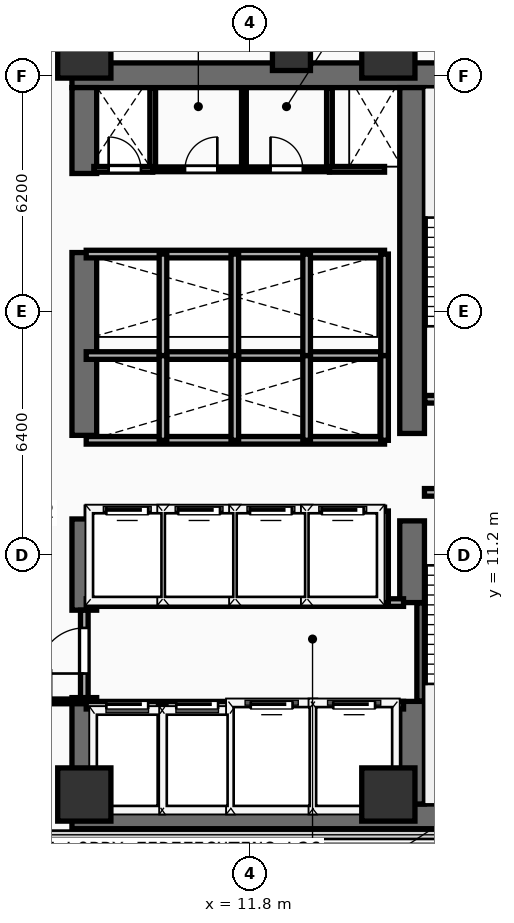
"""IFC4 building model, lengths in metres.
Left out: names, types, materials, properties, quantities, classifications, styles, units other than length and angle.
Written with IfcOpenShell. Run it as: python <this file> out.ifc"""

import sys

from ifc_helpers import new_model, si_unit, direction, frame, frame_2d, origin, origin_2d, place, context, subcontext, project, spatial, rectangle, extrude, element, fill, save


model = new_model("IFC4")
c1 = context("Model", 3, precision=1e-05, world=origin(), true_north=direction((0.0, 1.0)))
c2 = subcontext(c1, "Body", "Model", "MODEL_VIEW")
j1 = project(units=[si_unit("LENGTHUNIT", "METRE"), si_unit("PLANEANGLEUNIT", "RADIAN")], contexts=[c1])
p1 = place(None, origin())
s1 = spatial("IfcSite", under=j1, at=p1, CompositionType="ELEMENT")
p2 = place(p1, origin())
s2 = spatial("IfcBuilding", under=s1, at=p2, CompositionType="ELEMENT")
p3 = place(p2, frame((0.0, 0.0, 103.1)))
s3 = spatial("IfcBuildingStorey", under=s2, at=p3, CompositionType="ELEMENT", Elevation=103.1)
for number, where, z_axis, x_axis in (
    (1, (7.125, 4.325, 0.0), (0.0, 0.0, 1.0), (1.0, 0.0, 0.0)),
    (2, (7.125, 23.825, 0.0), (0.0, 0.0, 1.0), (1.0, 0.0, 0.0)),
):
    element("IfcWall", number, at=place(p3, frame(where, z_axis=z_axis, x_axis=x_axis)), inside=s3, PredefinedType="SHEAR", context=c2, shape_type="SweptSolid", body=[
        extrude(rectangle(XDim=14.0, YDim=0.65, at=frame_2d((7.0, 0.0))), origin(), (0.0, 0.0, 1.0), 3.54),
    ])
p4 = place(p3, frame((7.45, 4.65, 0.0), z_axis=(0.0, 0.0, 1.0), x_axis=(0.0, 1.0, 0.0)))
e3 = element("IfcWall", 3, at=p4, inside=s3, PredefinedType="SHEAR", context=c2, shape_type="SweptSolid", body=[
    extrude(rectangle(XDim=2.8, YDim=0.65, at=frame_2d((1.4, 0.0))), origin(), (0.0, 0.0, 1.0), 3.54),
])
p5 = place(p3, frame((7.45, 9.75, 0.0), z_axis=(0.0, 0.0, 1.0), x_axis=(0.0, 1.0, 0.0)))
e4 = element("IfcWall", 4, at=p5, inside=s3, PredefinedType="SHEAR", context=c2, shape_type="SweptSolid", body=[
    extrude(rectangle(XDim=2.4, YDim=0.65, at=frame_2d((1.2, 0.0))), origin(), (0.0, 0.0, 1.0), 3.54),
])
p6 = place(p3, frame((7.45, 14.35, 0.0), z_axis=(0.0, 0.0, 1.0), x_axis=(0.0, 1.0, 0.0)))
e5 = element("IfcWall", 5, at=p6, inside=s3, PredefinedType="SHEAR", context=c2, shape_type="SweptSolid", body=[
    extrude(rectangle(XDim=4.81, YDim=0.65, at=frame_2d((2.405, 0.0))), origin(), (0.0, 0.0, 1.0), 3.54),
])
p7 = place(p3, frame((7.45, 21.24, 0.0), z_axis=(0.0, 0.0, 1.0), x_axis=(0.0, 1.0, 0.0)))
e6 = element("IfcWall", 6, at=p7, inside=s3, PredefinedType="SHEAR", context=c2, shape_type="SweptSolid", body=[
    extrude(rectangle(XDim=2.26, YDim=0.65, at=frame_2d((1.13, 0.0))), origin(), (0.0, 0.0, 1.0), 3.54),
])
p8 = place(p3, frame((16.075, 4.65, 0.0), z_axis=(0.0, 0.0, 1.0), x_axis=(0.0, 1.0, 0.0)))
e7 = element("IfcWall", 7, at=p8, inside=s3, PredefinedType="SHEAR", context=c2, shape_type="SweptSolid", body=[
    extrude(rectangle(XDim=2.7, YDim=0.65, at=frame_2d((1.35, 0.0))), origin(), (0.0, 0.0, 1.0), 3.54),
])
p9 = place(p3, frame((16.075, 9.95, 0.0), z_axis=(0.0, 0.0, 1.0), x_axis=(0.0, 1.0, 0.0)))
e8 = element("IfcWall", 8, at=p9, inside=s3, PredefinedType="SHEAR", context=c2, shape_type="SweptSolid", body=[
    extrude(rectangle(XDim=2.15, YDim=0.65, at=frame_2d((1.075, 0.0))), origin(), (0.0, 0.0, 1.0), 3.54),
])
p10 = place(p3, frame((16.075, 14.4, 0.0), z_axis=(0.0, 0.0, 1.0), x_axis=(0.0, 1.0, 0.0)))
e9 = element("IfcWall", 9, at=p10, inside=s3, PredefinedType="SHEAR", context=c2, shape_type="SweptSolid", body=[
    extrude(rectangle(XDim=9.1, YDim=0.65, at=frame_2d((4.55, 0.0))), origin(), (0.0, 0.0, 1.0), 3.54),
])
for number, where, z_axis, x_axis in (
    (10, (7.45, 4.9, 0.0), (0.0, 0.0, 1.0), (1.0, 0.0, 0.0)),
    (11, (15.45, 4.9, 0.0), (0.0, 0.0, 1.0), (1.0, 0.0, 0.0)),
    (12, (7.45, 24.45, 0.0), (0.0, 0.0, 1.0), (1.0, 0.0, 0.0)),
    (13, (15.45, 24.45, 0.0), (0.0, 0.0, 1.0), (1.0, 0.0, 0.0)),
):
    element("IfcColumn", number, at=place(p3, frame(where, z_axis=z_axis, x_axis=x_axis)), inside=s3, PredefinedType="COLUMN", context=c2, shape_type="SweptSolid", body=[
        extrude(rectangle(XDim=1.4, YDim=1.4, at=origin_2d()), origin(), (0.0, 0.0, 1.0), 3.54),
    ])
p11 = place(p3, frame((12.9, 24.45, 0.0), z_axis=(0.0, 0.0, 1.0), x_axis=(1.0, 0.0, 0.0)))
e14 = element("IfcColumn", 14, at=p11, inside=s3, PredefinedType="COLUMN", context=c2, shape_type="SweptSolid", body=[
    extrude(rectangle(XDim=1.0, YDim=1.0, at=origin_2d()), origin(), (0.0, 0.0, 1.0), 3.54),
])
p12 = place(p3, frame((16.3, 7.36, 0.0), z_axis=(0.0, 0.0, 1.0), x_axis=(0.0, 1.0, 0.0)))
e15 = element("IfcWall", 15, at=p12, inside=s3, PredefinedType="SHEAR", context=c2, shape_type="SweptSolid", body=[
    extrude(rectangle(XDim=2.58, YDim=0.2, at=frame_2d((1.29, 0.0))), origin(), (0.0, 0.0, 1.0), 3.54),
])
p13 = place(p3, frame((16.4, 12.85, 0.0), z_axis=(0.0, 0.0, 1.0), x_axis=(1.0, 0.0, 0.0)))
e16 = element("IfcWall", 16, at=p13, inside=s3, PredefinedType="PARTITIONING", context=c2, shape_type="SweptSolid", body=[
    extrude(rectangle(XDim=3.96, YDim=0.2, at=frame_2d((1.98, 0.0))), origin(), (0.0, 0.0, 1.0), 3.54),
])
p14 = place(p13, frame((1.304, 0.0, 0.0)))
e17 = element("IfcOpeningElement", 17, at=p14, cuts=e16, PredefinedType="OPENING", context=c2, shape_type="SweptSolid", body=[
    extrude(rectangle(XDim=1.1, YDim=2.2, at=frame_2d((0.55, 1.1))), frame((0.0, 0.11, 0.0), z_axis=(0.0, -1.0, 0.0), x_axis=(1.0, 0.0, 0.0)), (0.0, 0.0, 1.0), 0.22),
])
p15 = place(p3, frame((16.41, 15.3, 0.0), z_axis=(0.0, 0.0, 1.0), x_axis=(1.0, 0.0, 0.0)))
e18 = element("IfcWall", 18, at=p15, inside=s3, PredefinedType="PARTITIONING", context=c2, shape_type="SweptSolid", body=[
    extrude(rectangle(XDim=3.95, YDim=0.2, at=frame_2d((1.975, 0.0))), origin(), (0.0, 0.0, 1.0), 3.54),
])
p16 = place(p15, frame((1.294, 0.0, 0.0)))
e19 = element("IfcOpeningElement", 19, at=p16, cuts=e18, PredefinedType="OPENING", context=c2, shape_type="SweptSolid", body=[
    extrude(rectangle(XDim=1.1, YDim=2.2, at=frame_2d((0.55, 1.1))), frame((0.0, 0.11, 0.0), z_axis=(0.0, -1.0, 0.0), x_axis=(1.0, 0.0, 0.0)), (0.0, 0.0, 1.0), 0.22),
])
p17 = place(p3, frame((7.5, 7.25, 0.0), z_axis=(0.0, 0.0, 1.0), x_axis=(1.0, 0.0, 0.0)))
e20 = element("IfcWall", 20, at=p17, inside=s3, PredefinedType="PARTITIONING", context=c2, shape_type="SweptSolid", body=[
    extrude(rectangle(XDim=8.35, YDim=0.2, at=frame_2d((4.175, 0.0))), origin(), (0.0, 0.0, 1.0), 3.54),
])
p18 = place(p17, frame((0.53, 0.0, 0.0)))
e21 = element("IfcOpeningElement", 21, at=p18, cuts=e20, PredefinedType="OPENING", context=c2, shape_type="SweptSolid", body=[
    extrude(rectangle(XDim=1.1, YDim=2.2, at=frame_2d((0.55, 1.1))), frame((0.0, 0.11, 0.0), z_axis=(0.0, -1.0, 0.0), x_axis=(1.0, 0.0, 0.0)), (0.0, 0.0, 1.0), 0.22),
])
p19 = place(p17, frame((2.37, 0.0, 0.0)))
e22 = element("IfcOpeningElement", 22, at=p19, cuts=e20, PredefinedType="OPENING", context=c2, shape_type="SweptSolid", body=[
    extrude(rectangle(XDim=1.1, YDim=2.2, at=frame_2d((0.55, 1.1))), frame((0.0, 0.11, 0.0), z_axis=(0.0, -1.0, 0.0), x_axis=(1.0, 0.0, 0.0)), (0.0, 0.0, 1.0), 0.22),
])
p20 = place(p17, frame((4.33, 0.0, 0.0)))
e23 = element("IfcOpeningElement", 23, at=p20, cuts=e20, PredefinedType="OPENING", context=c2, shape_type="SweptSolid", body=[
    extrude(rectangle(XDim=1.1, YDim=2.2, at=frame_2d((0.55, 1.1))), frame((0.0, 0.11, 0.0), z_axis=(0.0, -1.0, 0.0), x_axis=(1.0, 0.0, 0.0)), (0.0, 0.0, 1.0), 0.22),
])
p21 = place(p17, frame((6.5, 0.0, 0.0)))
e24 = element("IfcOpeningElement", 24, at=p21, cuts=e20, PredefinedType="OPENING", context=c2, shape_type="SweptSolid", body=[
    extrude(rectangle(XDim=1.1, YDim=2.2, at=frame_2d((0.55, 1.1))), frame((0.0, 0.11, 0.0), z_axis=(0.0, -1.0, 0.0), x_axis=(1.0, 0.0, 0.0)), (0.0, 0.0, 1.0), 0.22),
])
p22 = place(p3, frame((7.5, 9.95, 0.0), z_axis=(0.0, 0.0, 1.0), x_axis=(1.0, 0.0, 0.0)))
e25 = element("IfcWall", 25, at=p22, inside=s3, PredefinedType="PARTITIONING", context=c2, shape_type="SweptSolid", body=[
    extrude(rectangle(XDim=8.35, YDim=0.2, at=frame_2d((4.175, 0.0))), origin(), (0.0, 0.0, 1.0), 3.54),
])
for number, where, z_axis, x_axis in (
    (26, (9.5, 4.45, 0.0), (0.0, 0.0, 1.0), (0.0, 1.0, 0.0)),
    (27, (11.36, 4.45, 0.0), (0.0, 0.0, 1.0), (0.0, 1.0, 0.0)),
    (28, (13.46, 4.45, 0.0), (0.0, 0.0, 1.0), (0.0, 1.0, 0.0)),
):
    element("IfcWall", number, at=place(p3, frame(where, z_axis=z_axis, x_axis=x_axis)), inside=s3, PredefinedType="PARTITIONING", context=c2, shape_type="SweptSolid", body=[
        extrude(rectangle(XDim=2.8, YDim=0.2, at=frame_2d((1.4, 0.0))), origin(), (0.0, 0.0, 1.0), 3.54),
    ])
p23 = place(p3, frame((7.45, 7.45, 0.0), z_axis=(0.0, 0.0, 1.0), x_axis=(0.0, 1.0, 0.0)))
e29 = element("IfcWall", 29, at=p23, inside=s3, PredefinedType="PARTITIONING", context=c2, shape_type="SweptSolid", body=[
    extrude(rectangle(XDim=2.3, YDim=0.2, at=frame_2d((1.15, 0.0))), origin(), (0.0, 0.0, 1.0), 2.52),
])
p24 = place(p23, frame((0.633, 0.0, 0.0)))
e30 = element("IfcOpeningElement", 30, at=p24, cuts=e29, PredefinedType="OPENING", context=c2, shape_type="SweptSolid", body=[
    extrude(rectangle(XDim=1.2, YDim=2.25, at=frame_2d((0.6, 1.125))), frame((0.0, 0.11, 0.0), z_axis=(0.0, -1.0, 0.0), x_axis=(1.0, 0.0, 0.0)), (0.0, 0.0, 1.0), 0.22),
])
p25 = place(p3, frame((7.5, 12.36, 0.0), z_axis=(0.0, 0.0, 1.0), x_axis=(1.0, 0.0, 0.0)))
e31 = element("IfcWall", 31, at=p25, inside=s3, PredefinedType="PARTITIONING", context=c2, shape_type="SweptSolid", body=[
    extrude(rectangle(XDim=7.85, YDim=0.2, at=frame_2d((3.925, 0.0))), origin(), (0.0, 0.0, 1.0), 3.54),
])
p26 = place(p25, frame((0.53, 0.0, 0.0)))
e32 = element("IfcOpeningElement", 32, at=p26, cuts=e31, PredefinedType="OPENING", context=c2, shape_type="SweptSolid", body=[
    extrude(rectangle(XDim=1.1, YDim=2.2, at=frame_2d((0.55, 1.1))), frame((0.0, 0.11, 0.0), z_axis=(0.0, -1.0, 0.0), x_axis=(1.0, 0.0, 0.0)), (0.0, 0.0, 1.0), 0.22),
])
p27 = place(p25, frame((2.42, 0.0, 0.0)))
e33 = element("IfcOpeningElement", 33, at=p27, cuts=e31, PredefinedType="OPENING", context=c2, shape_type="SweptSolid", body=[
    extrude(rectangle(XDim=1.1, YDim=2.2, at=frame_2d((0.55, 1.1))), frame((0.0, 0.11, 0.0), z_axis=(0.0, -1.0, 0.0), x_axis=(1.0, 0.0, 0.0)), (0.0, 0.0, 1.0), 0.22),
])
p28 = place(p25, frame((4.31, 0.0, 0.0)))
e34 = element("IfcOpeningElement", 34, at=p28, cuts=e31, PredefinedType="OPENING", context=c2, shape_type="SweptSolid", body=[
    extrude(rectangle(XDim=1.1, YDim=2.2, at=frame_2d((0.55, 1.1))), frame((0.0, 0.11, 0.0), z_axis=(0.0, -1.0, 0.0), x_axis=(1.0, 0.0, 0.0)), (0.0, 0.0, 1.0), 0.22),
])
p29 = place(p25, frame((6.2, 0.0, 0.0)))
e35 = element("IfcOpeningElement", 35, at=p29, cuts=e31, PredefinedType="OPENING", context=c2, shape_type="SweptSolid", body=[
    extrude(rectangle(XDim=1.1, YDim=2.2, at=frame_2d((0.55, 1.1))), frame((0.0, 0.11, 0.0), z_axis=(0.0, -1.0, 0.0), x_axis=(1.0, 0.0, 0.0)), (0.0, 0.0, 1.0), 0.22),
])
for number, where, z_axis, x_axis in (
    (36, (15.35, 9.95, 0.0), (0.0, 0.0, 1.0), (0.0, 1.0, 0.0)),
    (37, (9.52, 9.95, 0.0), (0.0, 0.0, 1.0), (0.0, 1.0, 0.0)),
    (38, (11.41, 9.95, 0.0), (0.0, 0.0, 1.0), (0.0, 1.0, 0.0)),
    (39, (13.3, 9.95, 0.0), (0.0, 0.0, 1.0), (0.0, 1.0, 0.0)),
):
    element("IfcWall", number, at=place(p3, frame(where, z_axis=z_axis, x_axis=x_axis)), inside=s3, PredefinedType="PARTITIONING", context=c2, shape_type="SweptSolid", body=[
        extrude(rectangle(XDim=2.41, YDim=0.2, at=frame_2d((1.205, 0.0))), origin(), (0.0, 0.0, 1.0), 3.54),
    ])
for number, where, z_axis, x_axis in (
    (40, (7.5, 14.22, 0.0), (0.0, 0.0, 1.0), (1.0, 0.0, 0.0)),
    (41, (7.5, 16.45, 0.0), (0.0, 0.0, 1.0), (1.0, 0.0, 0.0)),
):
    element("IfcWall", number, at=place(p3, frame(where, z_axis=z_axis, x_axis=x_axis)), inside=s3, PredefinedType="PARTITIONING", context=c2, shape_type="SweptSolid", body=[
        extrude(rectangle(XDim=7.85, YDim=0.2, at=frame_2d((3.925, 0.0))), origin(), (0.0, 0.0, 1.0), 3.54),
    ])
for number, where, z_axis, x_axis in (
    (42, (15.35, 14.22, 0.0), (0.0, 0.0, 1.0), (0.0, 1.0, 0.0)),
    (43, (9.52, 14.22, 0.0), (0.0, 0.0, 1.0), (0.0, 1.0, 0.0)),
    (44, (11.41, 14.22, 0.0), (0.0, 0.0, 1.0), (0.0, 1.0, 0.0)),
    (45, (13.3, 14.22, 0.0), (0.0, 0.0, 1.0), (0.0, 1.0, 0.0)),
):
    element("IfcWall", number, at=place(p3, frame(where, z_axis=z_axis, x_axis=x_axis)), inside=s3, PredefinedType="PARTITIONING", context=c2, shape_type="SweptSolid", body=[
        extrude(rectangle(XDim=2.23, YDim=0.2, at=frame_2d((1.115, 0.0))), origin(), (0.0, 0.0, 1.0), 3.54),
    ])
p30 = place(p3, frame((7.5, 19.12, 0.0), z_axis=(0.0, 0.0, 1.0), x_axis=(1.0, 0.0, 0.0)))
e46 = element("IfcWall", 46, at=p30, inside=s3, PredefinedType="PARTITIONING", context=c2, shape_type="SweptSolid", body=[
    extrude(rectangle(XDim=7.85, YDim=0.2, at=frame_2d((3.925, 0.0))), origin(), (0.0, 0.0, 1.0), 3.54),
])
for number, where, z_axis, x_axis in (
    (47, (15.35, 16.45, 0.0), (0.0, 0.0, 1.0), (0.0, 1.0, 0.0)),
    (48, (9.52, 16.45, 0.0), (0.0, 0.0, 1.0), (0.0, 1.0, 0.0)),
    (49, (11.41, 16.45, 0.0), (0.0, 0.0, 1.0), (0.0, 1.0, 0.0)),
    (50, (13.3, 16.45, 0.0), (0.0, 0.0, 1.0), (0.0, 1.0, 0.0)),
):
    element("IfcWall", number, at=place(p3, frame(where, z_axis=z_axis, x_axis=x_axis)), inside=s3, PredefinedType="PARTITIONING", context=c2, shape_type="SweptSolid", body=[
        extrude(rectangle(XDim=2.67, YDim=0.2, at=frame_2d((1.335, 0.0))), origin(), (0.0, 0.0, 1.0), 3.54),
    ])
for number, where, z_axis, x_axis in (
    (51, (9.25, 21.35, 0.0), (0.0, 0.0, 1.0), (0.0, 1.0, 0.0)),
    (52, (13.9, 21.35, 0.0), (0.0, 0.0, 1.0), (0.0, 1.0, 0.0)),
):
    element("IfcWall", number, at=place(p3, frame(where, z_axis=z_axis, x_axis=x_axis)), inside=s3, PredefinedType="PARTITIONING", context=c2, shape_type="SweptSolid", body=[
        extrude(rectangle(XDim=2.13, YDim=0.15, at=frame_2d((1.065, 0.0))), origin(), (0.0, 0.0, 1.0), 3.54),
    ])
p31 = place(p3, frame((7.7, 21.35, 0.0), z_axis=(0.0, 0.0, 1.0), x_axis=(1.0, 0.0, 0.0)))
e53 = element("IfcWall", 53, at=p31, inside=s3, PredefinedType="PARTITIONING", context=c2, shape_type="SweptSolid", body=[
    extrude(rectangle(XDim=1.55, YDim=0.15, at=frame_2d((0.775, 0.0))), origin(), (0.0, 0.0, 1.0), 3.54),
])
p32 = place(p31, frame((0.39, 0.0, 0.0)))
e54 = element("IfcOpeningElement", 54, at=p32, cuts=e53, PredefinedType="OPENING", context=c2, shape_type="SweptSolid", body=[
    extrude(rectangle(XDim=0.85, YDim=2.15, at=frame_2d((0.425, 1.075))), frame((0.0, 0.085, 0.0), z_axis=(0.0, -1.0, 0.0), x_axis=(1.0, 0.0, 0.0)), (0.0, 0.0, 1.0), 0.17),
])
p33 = place(p3, frame((13.9, 21.35, 0.0), z_axis=(0.0, 0.0, 1.0), x_axis=(1.0, 0.0, 0.0)))
e55 = element("IfcWall", 55, at=p33, inside=s3, PredefinedType="PARTITIONING", context=c2, shape_type="SweptSolid", body=[
    extrude(rectangle(XDim=1.45, YDim=0.15, at=frame_2d((0.725, 0.0))), origin(), (0.0, 0.0, 1.0), 3.54),
])
p34 = place(p3, frame((9.25, 21.35, 0.0), z_axis=(0.0, 0.0, 1.0), x_axis=(1.0, 0.0, 0.0)))
e56 = element("IfcWall", 56, at=p34, inside=s3, PredefinedType="PARTITIONING", context=c2, shape_type="SweptSolid", body=[
    extrude(rectangle(XDim=4.65, YDim=0.125, at=frame_2d((2.325, 0.0))), origin(), (0.0, 0.0, 1.0), 3.54),
])
p35 = place(p34, frame((0.85, 0.0, 0.0)))
e57 = element("IfcOpeningElement", 57, at=p35, cuts=e56, PredefinedType="OPENING", context=c2, shape_type="SweptSolid", body=[
    extrude(rectangle(XDim=0.85, YDim=2.15, at=frame_2d((0.425, 1.075))), frame((0.0, 0.073, 0.0), z_axis=(0.0, -1.0, 0.0), x_axis=(1.0, 0.0, 0.0)), (0.0, 0.0, 1.0), 0.145),
])
p36 = place(p34, frame((3.1, 0.0, 0.0)))
e58 = element("IfcOpeningElement", 58, at=p36, cuts=e56, PredefinedType="OPENING", context=c2, shape_type="SweptSolid", body=[
    extrude(rectangle(XDim=0.85, YDim=2.15, at=frame_2d((0.425, 1.075))), frame((0.0, 0.073, 0.0), z_axis=(0.0, -1.0, 0.0), x_axis=(1.0, 0.0, 0.0)), (0.0, 0.0, 1.0), 0.145),
])
p37 = place(p3, frame((11.65, 21.35, 0.0), z_axis=(0.0, 0.0, 1.0), x_axis=(0.0, 1.0, 0.0)))
e59 = element("IfcWall", 59, at=p37, inside=s3, PredefinedType="PARTITIONING", context=c2, shape_type="SweptSolid", body=[
    extrude(rectangle(XDim=2.13, YDim=0.125, at=frame_2d((1.065, 0.0))), origin(), (0.0, 0.0, 1.0), 3.54),
])
p38 = place(p3, frame((1.64, 7.35, 0.0), z_axis=(0.0, 0.0, 1.0), x_axis=(1.0, 0.0, 0.0)))
e60 = element("IfcWall", 60, at=p38, inside=s3, PredefinedType="PARTITIONING", context=c2, shape_type="SweptSolid", body=[
    extrude(rectangle(XDim=5.76, YDim=0.125, at=frame_2d((2.88, 0.0))), origin(), (0.0, 0.0, 1.0), 3.54),
])
p39 = place(p38, frame((4.087, 0.0, 0.0)))
e61 = element("IfcOpeningElement", 61, at=p39, cuts=e60, PredefinedType="OPENING", context=c2, shape_type="SweptSolid", body=[
    extrude(rectangle(XDim=0.85, YDim=2.15, at=frame_2d((0.425, 1.075))), frame((0.0, 0.073, 0.0), z_axis=(0.0, -1.0, 0.0), x_axis=(1.0, 0.0, 0.0)), (0.0, 0.0, 1.0), 0.145),
])
p40 = place(p18, origin())
e62 = element("IfcDoor", 62, at=p40, inside=s3, OperationType="SLIDING_TO_LEFT", PredefinedType="DOOR", context=c2, shape_type="SweptSolid", body=[
    extrude(rectangle(XDim=1.1, YDim=2.2, at=frame_2d((0.55, 1.1))), frame((0.0, 0.025, 0.0), z_axis=(0.0, -1.0, 0.0), x_axis=(1.0, 0.0, 0.0)), (0.0, 0.0, 1.0), 0.05),
])
fill(e21, e62)
p41 = place(p19, origin())
e63 = element("IfcDoor", 63, at=p41, inside=s3, OperationType="SLIDING_TO_LEFT", PredefinedType="DOOR", context=c2, shape_type="SweptSolid", body=[
    extrude(rectangle(XDim=1.1, YDim=2.2, at=frame_2d((0.55, 1.1))), frame((0.0, 0.025, 0.0), z_axis=(0.0, -1.0, 0.0), x_axis=(1.0, 0.0, 0.0)), (0.0, 0.0, 1.0), 0.05),
])
fill(e22, e63)
p42 = place(p20, origin())
e64 = element("IfcDoor", 64, at=p42, inside=s3, OperationType="SLIDING_TO_LEFT", PredefinedType="DOOR", context=c2, shape_type="SweptSolid", body=[
    extrude(rectangle(XDim=1.1, YDim=2.2, at=frame_2d((0.55, 1.1))), frame((0.0, 0.025, 0.0), z_axis=(0.0, -1.0, 0.0), x_axis=(1.0, 0.0, 0.0)), (0.0, 0.0, 1.0), 0.05),
])
fill(e23, e64)
p43 = place(p21, origin())
e65 = element("IfcDoor", 65, at=p43, inside=s3, OperationType="SLIDING_TO_LEFT", PredefinedType="DOOR", context=c2, shape_type="SweptSolid", body=[
    extrude(rectangle(XDim=1.1, YDim=2.2, at=frame_2d((0.55, 1.1))), frame((0.0, 0.025, 0.0), z_axis=(0.0, -1.0, 0.0), x_axis=(1.0, 0.0, 0.0)), (0.0, 0.0, 1.0), 0.05),
])
fill(e24, e65)
p44 = place(p24, frame((1.2, 0.0, 0.0), z_axis=(0.0, 0.0, 1.0), x_axis=(-1.0, 0.0, 0.0)))
e66 = element("IfcDoor", 66, at=p44, inside=s3, OperationType="SINGLE_SWING_RIGHT", PredefinedType="DOOR", context=c2, shape_type="SweptSolid", body=[
    extrude(rectangle(XDim=1.2, YDim=2.25, at=frame_2d((0.6, 1.125))), frame((0.0, 0.025, 0.0), z_axis=(0.0, -1.0, 0.0), x_axis=(1.0, 0.0, 0.0)), (0.0, 0.0, 1.0), 0.05),
])
fill(e30, e66)
p45 = place(p26, origin())
e67 = element("IfcDoor", 67, at=p45, inside=s3, OperationType="SLIDING_TO_LEFT", PredefinedType="DOOR", context=c2, shape_type="SweptSolid", body=[
    extrude(rectangle(XDim=1.1, YDim=2.2, at=frame_2d((0.55, 1.1))), frame((0.0, 0.025, 0.0), z_axis=(0.0, -1.0, 0.0), x_axis=(1.0, 0.0, 0.0)), (0.0, 0.0, 1.0), 0.05),
])
fill(e32, e67)
p46 = place(p27, origin())
e68 = element("IfcDoor", 68, at=p46, inside=s3, OperationType="SLIDING_TO_LEFT", PredefinedType="DOOR", context=c2, shape_type="SweptSolid", body=[
    extrude(rectangle(XDim=1.1, YDim=2.2, at=frame_2d((0.55, 1.1))), frame((0.0, 0.025, 0.0), z_axis=(0.0, -1.0, 0.0), x_axis=(1.0, 0.0, 0.0)), (0.0, 0.0, 1.0), 0.05),
])
fill(e33, e68)
p47 = place(p28, origin())
e69 = element("IfcDoor", 69, at=p47, inside=s3, OperationType="SLIDING_TO_LEFT", PredefinedType="DOOR", context=c2, shape_type="SweptSolid", body=[
    extrude(rectangle(XDim=1.1, YDim=2.2, at=frame_2d((0.55, 1.1))), frame((0.0, 0.025, 0.0), z_axis=(0.0, -1.0, 0.0), x_axis=(1.0, 0.0, 0.0)), (0.0, 0.0, 1.0), 0.05),
])
fill(e34, e69)
p48 = place(p29, origin())
e70 = element("IfcDoor", 70, at=p48, inside=s3, OperationType="SLIDING_TO_LEFT", PredefinedType="DOOR", context=c2, shape_type="SweptSolid", body=[
    extrude(rectangle(XDim=1.1, YDim=2.2, at=frame_2d((0.55, 1.1))), frame((0.0, 0.025, 0.0), z_axis=(0.0, -1.0, 0.0), x_axis=(1.0, 0.0, 0.0)), (0.0, 0.0, 1.0), 0.05),
])
fill(e35, e70)
p49 = place(p32, origin())
e71 = element("IfcDoor", 71, at=p49, inside=s3, OperationType="SINGLE_SWING_LEFT", PredefinedType="DOOR", context=c2, shape_type="SweptSolid", body=[
    extrude(rectangle(XDim=0.85, YDim=2.15, at=frame_2d((0.425, 1.075))), frame((0.0, 0.025, 0.0), z_axis=(0.0, -1.0, 0.0), x_axis=(1.0, 0.0, 0.0)), (0.0, 0.0, 1.0), 0.05),
])
fill(e54, e71)
p50 = place(p35, origin())
e72 = element("IfcDoor", 72, at=p50, inside=s3, OperationType="SINGLE_SWING_RIGHT", PredefinedType="DOOR", context=c2, shape_type="SweptSolid", body=[
    extrude(rectangle(XDim=0.85, YDim=2.15, at=frame_2d((0.425, 1.075))), frame((0.0, 0.025, 0.0), z_axis=(0.0, -1.0, 0.0), x_axis=(1.0, 0.0, 0.0)), (0.0, 0.0, 1.0), 0.05),
])
fill(e57, e72)
p51 = place(p36, origin())
e73 = element("IfcDoor", 73, at=p51, inside=s3, OperationType="SINGLE_SWING_LEFT", PredefinedType="DOOR", context=c2, shape_type="SweptSolid", body=[
    extrude(rectangle(XDim=0.85, YDim=2.15, at=frame_2d((0.425, 1.075))), frame((0.0, 0.025, 0.0), z_axis=(0.0, -1.0, 0.0), x_axis=(1.0, 0.0, 0.0)), (0.0, 0.0, 1.0), 0.05),
])
fill(e58, e73)
save(model, sys.argv[1])
